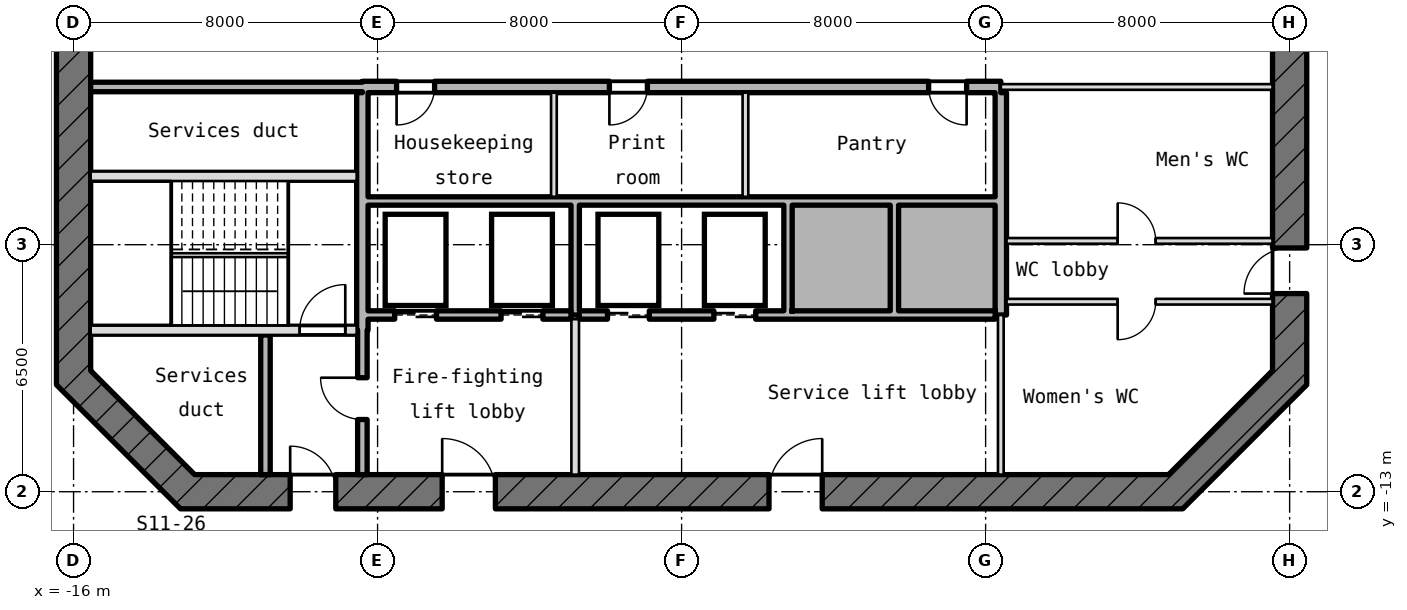
"""IFC4 building model, lengths in metres.
Left out: names, types, materials, properties, quantities, classifications, styles, units other than length and angle.
Written with IfcOpenShell. Run it as: python <this file> out.ifc"""

import sys

from ifc_helpers import new_model, si_unit, direction, frame, frame_2d, origin, place, context, subcontext, project, spatial, rectangle, extrude, element, fill, save


model = new_model("IFC4")
c1 = context("Model", 3, precision=1e-05, world=origin(), true_north=direction((0.0, 1.0)))
c2 = subcontext(c1, "Body", "Model", "MODEL_VIEW")
j1 = project(units=[si_unit("LENGTHUNIT", "METRE"), si_unit("PLANEANGLEUNIT", "RADIAN")], contexts=[c1])
p1 = place(None, origin())
s1 = spatial("IfcSite", under=j1, at=p1, CompositionType="ELEMENT")
p2 = place(p1, origin())
s2 = spatial("IfcBuilding", under=s1, at=p2, CompositionType="ELEMENT")
p3 = place(p2, frame((0.0, 0.0, 173.5)))
s3 = spatial("IfcBuildingStorey", under=s2, at=p3, CompositionType="ELEMENT", Elevation=173.5)
p4 = place(p3, frame((12.868, -13.132, -0.18), z_axis=(0.0, 0.0, 1.0), x_axis=(0.707106781187, 0.707106781187, 0.0)))
e1 = element("IfcWall", 1, at=p4, inside=s3, PredefinedType="SHEAR", context=c2, shape_type="SweptSolid", body=[
    extrude(rectangle(XDim=4.615, YDim=0.9, at=frame_2d((2.308, 0.0))), origin(), (0.0, 0.0, 1.0), 4.15),
])
p5 = place(p3, frame((16.0, -10.186, -0.18), z_axis=(0.0, 0.0, 1.0), x_axis=(0.0, 1.0, 0.0)))
e2 = element("IfcWall", 2, at=p5, inside=s3, PredefinedType="SHEAR", context=c2, shape_type="SweptSolid", body=[
    extrude(rectangle(XDim=20.373, YDim=0.9, at=frame_2d((10.186, 0.0))), origin(), (0.0, 0.0, 1.0), 4.15),
])
p6 = place(p5, frame((8.986, 0.0, 0.18)))
e3 = element("IfcOpeningElement", 3, at=p6, cuts=e2, PredefinedType="OPENING", context=c2, shape_type="SweptSolid", body=[
    extrude(rectangle(XDim=2.4, YDim=2.1, at=frame_2d((1.2, 1.05))), frame((0.0, 0.46, 0.0), z_axis=(0.0, -1.0, 0.0), x_axis=(1.0, 0.0, 0.0)), (0.0, 0.0, 1.0), 0.92),
])
p7 = place(p5, frame((13.586, 0.0, 0.18)))
e4 = element("IfcOpeningElement", 4, at=p7, cuts=e2, PredefinedType="OPENING", context=c2, shape_type="SweptSolid", body=[
    extrude(rectangle(XDim=1.2, YDim=2.1, at=frame_2d((0.6, 1.05))), frame((0.0, 0.46, 0.0), z_axis=(0.0, -1.0, 0.0), x_axis=(1.0, 0.0, 0.0)), (0.0, 0.0, 1.0), 0.92),
])
p8 = place(p5, frame((2.4, 0.0, 0.18)))
e5 = element("IfcOpeningElement", 5, at=p8, cuts=e2, PredefinedType="OPENING", context=c2, shape_type="SweptSolid", body=[
    extrude(rectangle(XDim=1.2, YDim=2.1, at=frame_2d((0.6, 1.05))), frame((0.0, 0.46, 0.0), z_axis=(0.0, -1.0, 0.0), x_axis=(1.0, 0.0, 0.0)), (0.0, 0.0, 1.0), 0.92),
])
p9 = place(p3, frame((-16.0, 10.186, -0.18), z_axis=(0.0, 0.0, 1.0), x_axis=(0.0, -1.0, 0.0)))
e6 = element("IfcWall", 6, at=p9, inside=s3, PredefinedType="SHEAR", context=c2, shape_type="SweptSolid", body=[
    extrude(rectangle(XDim=20.373, YDim=0.9, at=frame_2d((10.186, 0.0))), origin(), (0.0, 0.0, 1.0), 4.15),
])
p10 = place(p9, frame((8.986, 0.0, 0.18)))
e7 = element("IfcOpeningElement", 7, at=p10, cuts=e6, PredefinedType="OPENING", context=c2, shape_type="SweptSolid", body=[
    extrude(rectangle(XDim=2.4, YDim=2.1, at=frame_2d((1.2, 1.05))), frame((0.0, 0.46, 0.0), z_axis=(0.0, -1.0, 0.0), x_axis=(1.0, 0.0, 0.0)), (0.0, 0.0, 1.0), 0.92),
])
p11 = place(p9, frame((5.586, 0.0, 0.18)))
e8 = element("IfcOpeningElement", 8, at=p11, cuts=e6, PredefinedType="OPENING", context=c2, shape_type="SweptSolid", body=[
    extrude(rectangle(XDim=1.2, YDim=2.1, at=frame_2d((0.6, 1.05))), frame((0.0, 0.46, 0.0), z_axis=(0.0, -1.0, 0.0), x_axis=(1.0, 0.0, 0.0)), (0.0, 0.0, 1.0), 0.92),
])
p12 = place(p3, frame((-16.132, -9.868, -0.18), z_axis=(0.0, 0.0, 1.0), x_axis=(0.707106781187, -0.707106781187, 0.0)))
e9 = element("IfcWall", 9, at=p12, inside=s3, PredefinedType="SHEAR", context=c2, shape_type="SweptSolid", body=[
    extrude(rectangle(XDim=4.615, YDim=0.9, at=frame_2d((2.308, 0.0))), origin(), (0.0, 0.0, 1.0), 4.15),
])
p13 = place(p3, frame((-13.186, -13.0, -0.18), z_axis=(0.0, 0.0, 1.0), x_axis=(1.0, 0.0, 0.0)))
e10 = element("IfcWall", 10, at=p13, inside=s3, PredefinedType="SHEAR", context=c2, shape_type="SweptSolid", body=[
    extrude(rectangle(XDim=26.373, YDim=0.9, at=frame_2d((13.186, 0.0))), origin(), (0.0, 0.0, 1.0), 4.15),
])
p14 = place(p13, frame((2.886, 0.0, 0.18)))
e11 = element("IfcOpeningElement", 11, at=p14, cuts=e10, PredefinedType="OPENING", context=c2, shape_type="SweptSolid", body=[
    extrude(rectangle(XDim=1.2, YDim=2.1, at=frame_2d((0.6, 1.05))), frame((0.0, 0.46, 0.0), z_axis=(0.0, -1.0, 0.0), x_axis=(1.0, 0.0, 0.0)), (0.0, 0.0, 1.0), 0.92),
])
p15 = place(p13, frame((6.886, 0.0, 0.18)))
e12 = element("IfcOpeningElement", 12, at=p15, cuts=e10, PredefinedType="OPENING", context=c2, shape_type="SweptSolid", body=[
    extrude(rectangle(XDim=1.4, YDim=2.1, at=frame_2d((0.7, 1.05))), frame((0.0, 0.46, 0.0), z_axis=(0.0, -1.0, 0.0), x_axis=(1.0, 0.0, 0.0)), (0.0, 0.0, 1.0), 0.92),
])
p16 = place(p13, frame((15.486, 0.0, 0.18)))
e13 = element("IfcOpeningElement", 13, at=p16, cuts=e10, PredefinedType="OPENING", context=c2, shape_type="SweptSolid", body=[
    extrude(rectangle(XDim=1.4, YDim=2.1, at=frame_2d((0.7, 1.05))), frame((0.0, 0.46, 0.0), z_axis=(0.0, -1.0, 0.0), x_axis=(1.0, 0.0, 0.0)), (0.0, 0.0, 1.0), 0.92),
])
p17 = place(p3, frame((-15.55, -8.75, -0.18), z_axis=(0.0, 0.0, 1.0), x_axis=(1.0, 0.0, 0.0)))
e14 = element("IfcWall", 14, at=p17, inside=s3, PredefinedType="SHEAR", context=c2, shape_type="SweptSolid", body=[
    extrude(rectangle(XDim=7.0, YDim=0.25, at=frame_2d((3.5, 0.0))), origin(), (0.0, 0.0, 1.0), 4.15),
])
p18 = place(p17, frame((5.5, 0.0, 0.18)))
e15 = element("IfcOpeningElement", 15, at=p18, cuts=e14, PredefinedType="OPENING", context=c2, shape_type="SweptSolid", body=[
    extrude(rectangle(XDim=1.2, YDim=2.1, at=frame_2d((0.6, 1.05))), frame((0.0, 0.135, 0.0), z_axis=(0.0, -1.0, 0.0), x_axis=(1.0, 0.0, 0.0)), (0.0, 0.0, 1.0), 0.27),
])
p19 = place(p3, frame((-8.25, -8.35, 0.0), z_axis=(0.0, 0.0, 1.0), x_axis=(1.0, 0.0, 0.0)))
e16 = element("IfcWall", 16, at=p19, inside=s3, PredefinedType="STANDARD", context=c2, shape_type="SweptSolid", body=[
    extrude(rectangle(XDim=5.34, YDim=0.22, at=frame_2d((2.67, 0.0))), origin(), (0.0, 0.0, 1.0), 3.97),
])
p20 = place(p19, frame((0.7, 0.0, 0.0)))
e17 = element("IfcOpeningElement", 17, at=p20, cuts=e16, PredefinedType="OPENING", context=c2, shape_type="SweptSolid", body=[
    extrude(rectangle(XDim=1.1, YDim=2.1, at=frame_2d((0.55, 1.05))), frame((0.0, 0.12, 0.0), z_axis=(0.0, -1.0, 0.0), x_axis=(1.0, 0.0, 0.0)), (0.0, 0.0, 1.0), 0.24),
])
p21 = place(p19, frame((3.5, 0.0, 0.0)))
e18 = element("IfcOpeningElement", 18, at=p21, cuts=e16, PredefinedType="OPENING", context=c2, shape_type="SweptSolid", body=[
    extrude(rectangle(XDim=1.1, YDim=2.1, at=frame_2d((0.55, 1.05))), frame((0.0, 0.12, 0.0), z_axis=(0.0, -1.0, 0.0), x_axis=(1.0, 0.0, 0.0)), (0.0, 0.0, 1.0), 0.24),
])
p22 = place(p3, frame((-2.69, -8.35, 0.0), z_axis=(0.0, 0.0, 1.0), x_axis=(1.0, 0.0, 0.0)))
e19 = element("IfcWall", 19, at=p22, inside=s3, PredefinedType="STANDARD", context=c2, shape_type="SweptSolid", body=[
    extrude(rectangle(XDim=10.94, YDim=0.22, at=frame_2d((5.47, 0.0))), origin(), (0.0, 0.0, 1.0), 3.97),
])
p23 = place(p22, frame((0.74, 0.0, 0.0)))
e20 = element("IfcOpeningElement", 20, at=p23, cuts=e19, PredefinedType="OPENING", context=c2, shape_type="SweptSolid", body=[
    extrude(rectangle(XDim=1.1, YDim=2.1, at=frame_2d((0.55, 1.05))), frame((0.0, 0.12, 0.0), z_axis=(0.0, -1.0, 0.0), x_axis=(1.0, 0.0, 0.0)), (0.0, 0.0, 1.0), 0.24),
])
p24 = place(p22, frame((3.54, 0.0, 0.0)))
e21 = element("IfcOpeningElement", 21, at=p24, cuts=e19, PredefinedType="OPENING", context=c2, shape_type="SweptSolid", body=[
    extrude(rectangle(XDim=1.1, YDim=2.1, at=frame_2d((0.55, 1.05))), frame((0.0, 0.12, 0.0), z_axis=(0.0, -1.0, 0.0), x_axis=(1.0, 0.0, 0.0)), (0.0, 0.0, 1.0), 0.24),
])
p25 = place(p3, frame((8.55, -8.0, 0.0), z_axis=(0.0, 0.0, 1.0), x_axis=(1.0, 0.0, 0.0)))
e22 = element("IfcWall", 22, at=p25, inside=s3, PredefinedType="PARTITIONING", context=c2, shape_type="SweptSolid", body=[
    extrude(rectangle(XDim=7.0, YDim=0.15, at=frame_2d((3.5, 0.0))), origin(), (0.0, 0.0, 1.0), 3.97),
])
p26 = place(p25, frame((2.925, 0.0, 0.0)))
e23 = element("IfcOpeningElement", 23, at=p26, cuts=e22, PredefinedType="OPENING", context=c2, shape_type="SweptSolid", body=[
    extrude(rectangle(XDim=1.0, YDim=2.1, at=frame_2d((0.5, 1.05))), frame((0.0, 0.085, 0.0), z_axis=(0.0, -1.0, 0.0), x_axis=(1.0, 0.0, 0.0)), (0.0, 0.0, 1.0), 0.17),
])
p27 = place(p3, frame((8.55, -6.4, 0.0), z_axis=(0.0, 0.0, 1.0), x_axis=(1.0, 0.0, 0.0)))
e24 = element("IfcWall", 24, at=p27, inside=s3, PredefinedType="PARTITIONING", context=c2, shape_type="SweptSolid", body=[
    extrude(rectangle(XDim=7.0, YDim=0.15, at=frame_2d((3.5, 0.0))), origin(), (0.0, 0.0, 1.0), 3.97),
])
p28 = place(p27, frame((2.925, 0.0, 0.0)))
e25 = element("IfcOpeningElement", 25, at=p28, cuts=e24, PredefinedType="OPENING", context=c2, shape_type="SweptSolid", body=[
    extrude(rectangle(XDim=1.0, YDim=2.1, at=frame_2d((0.5, 1.05))), frame((0.0, 0.085, 0.0), z_axis=(0.0, -1.0, 0.0), x_axis=(1.0, 0.0, 0.0)), (0.0, 0.0, 1.0), 0.17),
])
p29 = place(p3, frame((-8.25, -5.35, 0.0), z_axis=(0.0, 0.0, 1.0), x_axis=(1.0, 0.0, 0.0)))
e26 = element("IfcWall", 26, at=p29, inside=s3, PredefinedType="STANDARD", context=c2, shape_type="SweptSolid", body=[
    extrude(rectangle(XDim=16.5, YDim=0.22, at=frame_2d((8.25, 0.0))), origin(), (0.0, 0.0, 1.0), 3.97),
])
p30 = place(p3, frame((-15.55, -4.7, -0.18), z_axis=(0.0, 0.0, 1.0), x_axis=(1.0, 0.0, 0.0)))
e27 = element("IfcWall", 27, at=p30, inside=s3, PredefinedType="SHEAR", context=c2, shape_type="SweptSolid", body=[
    extrude(rectangle(XDim=7.0, YDim=0.25, at=frame_2d((3.5, 0.0))), origin(), (0.0, 0.0, 1.0), 4.15),
])
p31 = place(p3, frame((-15.55, -2.35, 0.0), z_axis=(0.0, 0.0, 1.0), x_axis=(1.0, 0.0, 0.0)))
e28 = element("IfcWall", 28, at=p31, inside=s3, PredefinedType="STANDARD", context=c2, shape_type="SweptSolid", body=[
    extrude(rectangle(XDim=7.15, YDim=0.25, at=frame_2d((3.575, 0.0))), origin(), (0.0, 0.0, 1.0), 3.97),
])
p32 = place(p3, frame((-8.4, -2.35, -0.18), z_axis=(0.0, 0.0, 1.0), x_axis=(1.0, 0.0, 0.0)))
e29 = element("IfcWall", 29, at=p32, inside=s3, PredefinedType="SHEAR", context=c2, shape_type="SweptSolid", body=[
    extrude(rectangle(XDim=16.8, YDim=0.3, at=frame_2d((8.4, 0.0))), origin(), (0.0, 0.0, 1.0), 4.15),
])
p33 = place(p32, frame((0.9, 0.0, 0.18)))
e30 = element("IfcOpeningElement", 30, at=p33, cuts=e29, PredefinedType="OPENING", context=c2, shape_type="SweptSolid", body=[
    extrude(rectangle(XDim=1.0, YDim=2.1, at=frame_2d((0.5, 1.05))), frame((0.0, 0.16, 0.0), z_axis=(0.0, -1.0, 0.0), x_axis=(1.0, 0.0, 0.0)), (0.0, 0.0, 1.0), 0.32),
])
p34 = place(p32, frame((6.5, 0.0, 0.18)))
e31 = element("IfcOpeningElement", 31, at=p34, cuts=e29, PredefinedType="OPENING", context=c2, shape_type="SweptSolid", body=[
    extrude(rectangle(XDim=1.0, YDim=2.1, at=frame_2d((0.5, 1.05))), frame((0.0, 0.16, 0.0), z_axis=(0.0, -1.0, 0.0), x_axis=(1.0, 0.0, 0.0)), (0.0, 0.0, 1.0), 0.32),
])
p35 = place(p32, frame((14.9, 0.0, 0.18)))
e32 = element("IfcOpeningElement", 32, at=p35, cuts=e29, PredefinedType="OPENING", context=c2, shape_type="SweptSolid", body=[
    extrude(rectangle(XDim=1.0, YDim=2.1, at=frame_2d((0.5, 1.05))), frame((0.0, 0.16, 0.0), z_axis=(0.0, -1.0, 0.0), x_axis=(1.0, 0.0, 0.0)), (0.0, 0.0, 1.0), 0.32),
])
p36 = place(p3, frame((8.4, -2.35, 0.0), z_axis=(0.0, 0.0, 1.0), x_axis=(1.0, 0.0, 0.0)))
e33 = element("IfcWall", 33, at=p36, inside=s3, PredefinedType="PARTITIONING", context=c2, shape_type="SweptSolid", body=[
    extrude(rectangle(XDim=7.15, YDim=0.15, at=frame_2d((3.575, 0.0))), origin(), (0.0, 0.0, 1.0), 3.97),
])
p37 = place(p3, frame((-10.95, -12.55, 0.0), z_axis=(0.0, 0.0, 1.0), x_axis=(0.0, 1.0, 0.0)))
e34 = element("IfcWall", 34, at=p37, inside=s3, PredefinedType="STANDARD", context=c2, shape_type="SweptSolid", body=[
    extrude(rectangle(XDim=3.675, YDim=0.25, at=frame_2d((1.837, 0.0))), origin(), (0.0, 0.0, 1.0), 3.97),
])
p38 = place(p3, frame((-8.4, -12.55, 0.0), z_axis=(0.0, 0.0, 1.0), x_axis=(0.0, 1.0, 0.0)))
e35 = element("IfcWall", 35, at=p38, inside=s3, PredefinedType="STANDARD", context=c2, shape_type="SweptSolid", body=[
    extrude(rectangle(XDim=3.8, YDim=0.25, at=frame_2d((1.9, 0.0))), origin(), (0.0, 0.0, 1.0), 3.97),
])
p39 = place(p38, frame((1.45, 0.0, 0.0)))
e36 = element("IfcOpeningElement", 36, at=p39, cuts=e35, PredefinedType="OPENING", context=c2, shape_type="SweptSolid", body=[
    extrude(rectangle(XDim=1.1, YDim=2.1, at=frame_2d((0.55, 1.05))), frame((0.0, 0.135, 0.0), z_axis=(0.0, -1.0, 0.0), x_axis=(1.0, 0.0, 0.0)), (0.0, 0.0, 1.0), 0.27),
])
p40 = place(p3, frame((-8.4, -8.75, -0.18), z_axis=(0.0, 0.0, 1.0), x_axis=(0.0, 1.0, 0.0)))
e37 = element("IfcWall", 37, at=p40, inside=s3, PredefinedType="SHEAR", context=c2, shape_type="SweptSolid", body=[
    extrude(rectangle(XDim=6.25, YDim=0.3, at=frame_2d((3.125, 0.0))), origin(), (0.0, 0.0, 1.0), 4.15),
])
p41 = place(p3, frame((-3.36, -5.24, 0.0), z_axis=(0.0, 0.0, 1.0), x_axis=(0.0, 1.0, 0.0)))
e38 = element("IfcWall", 38, at=p41, inside=s3, PredefinedType="PARTITIONING", context=c2, shape_type="SweptSolid", body=[
    extrude(rectangle(XDim=2.74, YDim=0.15, at=frame_2d((1.37, 0.0))), origin(), (0.0, 0.0, 1.0), 3.97),
])
p42 = place(p3, frame((-2.8, -12.55, 0.0), z_axis=(0.0, 0.0, 1.0), x_axis=(0.0, 1.0, 0.0)))
e39 = element("IfcWall", 39, at=p42, inside=s3, PredefinedType="PARTITIONING", context=c2, shape_type="SweptSolid", body=[
    extrude(rectangle(XDim=4.09, YDim=0.2, at=frame_2d((2.045, 0.0))), origin(), (0.0, 0.0, 1.0), 3.97),
])
p43 = place(p3, frame((-2.8, -8.35, 0.0), z_axis=(0.0, 0.0, 1.0), x_axis=(0.0, 1.0, 0.0)))
e40 = element("IfcWall", 40, at=p43, inside=s3, PredefinedType="STANDARD", context=c2, shape_type="SweptSolid", body=[
    extrude(rectangle(XDim=2.89, YDim=0.22, at=frame_2d((1.445, 0.0))), origin(), (0.0, 0.0, 1.0), 3.97),
])
p44 = place(p3, frame((1.68, -5.24, 0.0), z_axis=(0.0, 0.0, 1.0), x_axis=(0.0, 1.0, 0.0)))
e41 = element("IfcWall", 41, at=p44, inside=s3, PredefinedType="PARTITIONING", context=c2, shape_type="SweptSolid", body=[
    extrude(rectangle(XDim=2.74, YDim=0.15, at=frame_2d((1.37, 0.0))), origin(), (0.0, 0.0, 1.0), 3.97),
])
for number, where, z_axis, x_axis in (
    (42, (2.8, -8.24, 0.0), (0.0, 0.0, 1.0), (0.0, 1.0, 0.0)),
    (43, (5.6, -8.24, 0.0), (0.0, 0.0, 1.0), (0.0, 1.0, 0.0)),
):
    element("IfcWall", number, at=place(p3, frame(where, z_axis=z_axis, x_axis=x_axis)), inside=s3, PredefinedType="STANDARD", context=c2, shape_type="SweptSolid", body=[
        extrude(rectangle(XDim=2.78, YDim=0.22, at=frame_2d((1.39, 0.0))), origin(), (0.0, 0.0, 1.0), 3.97),
    ])
p45 = place(p3, frame((8.4, -12.55, 0.0), z_axis=(0.0, 0.0, 1.0), x_axis=(0.0, 1.0, 0.0)))
e44 = element("IfcWall", 44, at=p45, inside=s3, PredefinedType="PARTITIONING", context=c2, shape_type="SweptSolid", body=[
    extrude(rectangle(XDim=4.2, YDim=0.15, at=frame_2d((2.1, 0.0))), origin(), (0.0, 0.0, 1.0), 3.97),
])
p46 = place(p3, frame((8.4, -8.35, -0.18), z_axis=(0.0, 0.0, 1.0), x_axis=(0.0, 1.0, 0.0)))
e45 = element("IfcWall", 45, at=p46, inside=s3, PredefinedType="SHEAR", context=c2, shape_type="SweptSolid", body=[
    extrude(rectangle(XDim=5.85, YDim=0.3, at=frame_2d((2.925, 0.0))), origin(), (0.0, 0.0, 1.0), 4.15),
])
p47 = place(p20, origin())
e46 = element("IfcDoor", 46, at=p47, inside=s3, OperationType="DOUBLE_DOOR_SLIDING", PredefinedType="DOOR", context=c2, shape_type="SweptSolid", body=[
    extrude(rectangle(XDim=1.1, YDim=2.1, at=frame_2d((0.55, 1.05))), frame((0.0, 0.025, 0.0), z_axis=(0.0, -1.0, 0.0), x_axis=(1.0, 0.0, 0.0)), (0.0, 0.0, 1.0), 0.05),
])
fill(e17, e46)
p48 = place(p21, origin())
e47 = element("IfcDoor", 47, at=p48, inside=s3, OperationType="DOUBLE_DOOR_SLIDING", PredefinedType="DOOR", context=c2, shape_type="SweptSolid", body=[
    extrude(rectangle(XDim=1.1, YDim=2.1, at=frame_2d((0.55, 1.05))), frame((0.0, 0.025, 0.0), z_axis=(0.0, -1.0, 0.0), x_axis=(1.0, 0.0, 0.0)), (0.0, 0.0, 1.0), 0.05),
])
fill(e18, e47)
p49 = place(p23, origin())
e48 = element("IfcDoor", 48, at=p49, inside=s3, OperationType="DOUBLE_DOOR_SLIDING", PredefinedType="DOOR", context=c2, shape_type="SweptSolid", body=[
    extrude(rectangle(XDim=1.1, YDim=2.1, at=frame_2d((0.55, 1.05))), frame((0.0, 0.025, 0.0), z_axis=(0.0, -1.0, 0.0), x_axis=(1.0, 0.0, 0.0)), (0.0, 0.0, 1.0), 0.05),
])
fill(e20, e48)
p50 = place(p24, origin())
e49 = element("IfcDoor", 49, at=p50, inside=s3, OperationType="DOUBLE_DOOR_SLIDING", PredefinedType="DOOR", context=c2, shape_type="SweptSolid", body=[
    extrude(rectangle(XDim=1.1, YDim=2.1, at=frame_2d((0.55, 1.05))), frame((0.0, 0.025, 0.0), z_axis=(0.0, -1.0, 0.0), x_axis=(1.0, 0.0, 0.0)), (0.0, 0.0, 1.0), 0.05),
])
fill(e21, e49)
p51 = place(p18, origin())
e50 = element("IfcDoor", 50, at=p51, inside=s3, OperationType="SINGLE_SWING_RIGHT", PredefinedType="DOOR", context=c2, shape_type="SweptSolid", body=[
    extrude(rectangle(XDim=1.2, YDim=2.1, at=frame_2d((0.6, 1.05))), frame((0.0, 0.025, 0.0), z_axis=(0.0, -1.0, 0.0), x_axis=(1.0, 0.0, 0.0)), (0.0, 0.0, 1.0), 0.05),
])
fill(e15, e50)
p52 = place(p39, origin())
e51 = element("IfcDoor", 51, at=p52, inside=s3, OperationType="SINGLE_SWING_RIGHT", PredefinedType="DOOR", context=c2, shape_type="SweptSolid", body=[
    extrude(rectangle(XDim=1.1, YDim=2.1, at=frame_2d((0.55, 1.05))), frame((0.0, 0.025, 0.0), z_axis=(0.0, -1.0, 0.0), x_axis=(1.0, 0.0, 0.0)), (0.0, 0.0, 1.0), 0.05),
])
fill(e36, e51)
p53 = place(p14, origin())
e52 = element("IfcDoor", 52, at=p53, inside=s3, OperationType="SINGLE_SWING_RIGHT", PredefinedType="DOOR", context=c2, shape_type="SweptSolid", body=[
    extrude(rectangle(XDim=1.2, YDim=2.1, at=frame_2d((0.6, 1.05))), frame((0.0, 0.025, 0.0), z_axis=(0.0, -1.0, 0.0), x_axis=(1.0, 0.0, 0.0)), (0.0, 0.0, 1.0), 0.05),
])
fill(e11, e52)
p54 = place(p15, origin())
e53 = element("IfcDoor", 53, at=p54, inside=s3, OperationType="SINGLE_SWING_RIGHT", PredefinedType="DOOR", context=c2, shape_type="SweptSolid", body=[
    extrude(rectangle(XDim=1.4, YDim=2.1, at=frame_2d((0.7, 1.05))), frame((0.0, 0.025, 0.0), z_axis=(0.0, -1.0, 0.0), x_axis=(1.0, 0.0, 0.0)), (0.0, 0.0, 1.0), 0.05),
])
fill(e12, e53)
p55 = place(p16, origin())
e54 = element("IfcDoor", 54, at=p55, inside=s3, OperationType="SINGLE_SWING_RIGHT", PredefinedType="DOOR", context=c2, shape_type="SweptSolid", body=[
    extrude(rectangle(XDim=1.4, YDim=2.1, at=frame_2d((0.7, 1.05))), frame((0.0, 0.025, 0.0), z_axis=(0.0, -1.0, 0.0), x_axis=(1.0, 0.0, 0.0)), (0.0, 0.0, 1.0), 0.05),
])
fill(e13, e54)
p56 = place(p33, frame((1.0, 0.0, 0.0), z_axis=(0.0, 0.0, 1.0), x_axis=(-1.0, 0.0, 0.0)))
e55 = element("IfcDoor", 55, at=p56, inside=s3, OperationType="SINGLE_SWING_LEFT", PredefinedType="DOOR", context=c2, shape_type="SweptSolid", body=[
    extrude(rectangle(XDim=1.0, YDim=2.1, at=frame_2d((0.5, 1.05))), frame((0.0, 0.025, 0.0), z_axis=(0.0, -1.0, 0.0), x_axis=(1.0, 0.0, 0.0)), (0.0, 0.0, 1.0), 0.05),
])
fill(e30, e55)
p57 = place(p34, frame((1.0, 0.0, 0.0), z_axis=(0.0, 0.0, 1.0), x_axis=(-1.0, 0.0, 0.0)))
e56 = element("IfcDoor", 56, at=p57, inside=s3, OperationType="SINGLE_SWING_LEFT", PredefinedType="DOOR", context=c2, shape_type="SweptSolid", body=[
    extrude(rectangle(XDim=1.0, YDim=2.1, at=frame_2d((0.5, 1.05))), frame((0.0, 0.025, 0.0), z_axis=(0.0, -1.0, 0.0), x_axis=(1.0, 0.0, 0.0)), (0.0, 0.0, 1.0), 0.05),
])
fill(e31, e56)
p58 = place(p35, frame((1.0, 0.0, 0.0), z_axis=(0.0, 0.0, 1.0), x_axis=(-1.0, 0.0, 0.0)))
e57 = element("IfcDoor", 57, at=p58, inside=s3, OperationType="SINGLE_SWING_LEFT", PredefinedType="DOOR", context=c2, shape_type="SweptSolid", body=[
    extrude(rectangle(XDim=1.0, YDim=2.1, at=frame_2d((0.5, 1.05))), frame((0.0, 0.025, 0.0), z_axis=(0.0, -1.0, 0.0), x_axis=(1.0, 0.0, 0.0)), (0.0, 0.0, 1.0), 0.05),
])
fill(e32, e57)
p59 = place(p28, origin())
e58 = element("IfcDoor", 58, at=p59, inside=s3, OperationType="SINGLE_SWING_RIGHT", PredefinedType="DOOR", context=c2, shape_type="SweptSolid", body=[
    extrude(rectangle(XDim=1.0, YDim=2.1, at=frame_2d((0.5, 1.05))), frame((0.0, 0.025, 0.0), z_axis=(0.0, -1.0, 0.0), x_axis=(1.0, 0.0, 0.0)), (0.0, 0.0, 1.0), 0.05),
])
fill(e25, e58)
p60 = place(p8, origin())
e59 = element("IfcDoor", 59, at=p60, inside=s3, OperationType="SINGLE_SWING_RIGHT", PredefinedType="DOOR", context=c2, shape_type="SweptSolid", body=[
    extrude(rectangle(XDim=1.2, YDim=2.1, at=frame_2d((0.6, 1.05))), frame((0.0, 0.025, 0.0), z_axis=(0.0, -1.0, 0.0), x_axis=(1.0, 0.0, 0.0)), (0.0, 0.0, 1.0), 0.05),
])
fill(e5, e59)
p61 = place(p26, frame((1.0, 0.0, 0.0), z_axis=(0.0, 0.0, 1.0), x_axis=(-1.0, 0.0, 0.0)))
e60 = element("IfcDoor", 60, at=p61, inside=s3, OperationType="SINGLE_SWING_LEFT", PredefinedType="DOOR", context=c2, shape_type="SweptSolid", body=[
    extrude(rectangle(XDim=1.0, YDim=2.1, at=frame_2d((0.5, 1.05))), frame((0.0, 0.025, 0.0), z_axis=(0.0, -1.0, 0.0), x_axis=(1.0, 0.0, 0.0)), (0.0, 0.0, 1.0), 0.05),
])
fill(e23, e60)
save(model, sys.argv[1])
